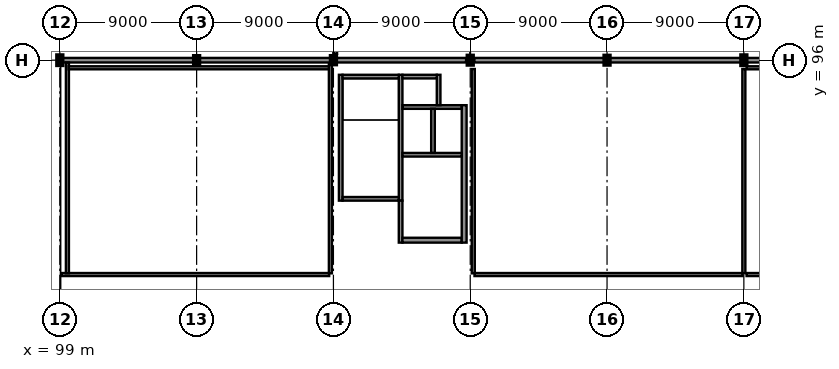
"""IFC4 building model, lengths in metres.
Left out: names, types, materials, properties, quantities, classifications, styles, units other than length and angle.
Written with IfcOpenShell. Run it as: python <this file> out.ifc"""

import sys

from ifc_helpers import new_model, si_unit, direction, frame, frame_2d, origin, origin_2d, place, context, subcontext, project, spatial, rectangle, i_section, extrude, element, fill, save


model = new_model("IFC4")
c1 = context("Model", 3, precision=1e-05, world=origin(), true_north=direction((0.0, 1.0)))
c2 = subcontext(c1, "Body", "Model", "MODEL_VIEW")
j1 = project(units=[si_unit("LENGTHUNIT", "METRE"), si_unit("PLANEANGLEUNIT", "RADIAN")], contexts=[c1])
p1 = place(None, origin())
s1 = spatial("IfcSite", under=j1, at=p1, CompositionType="ELEMENT")
p2 = place(p1, origin())
s2 = spatial("IfcBuilding", under=s1, at=p2, CompositionType="ELEMENT")
p3 = place(p2, frame((0.0, 0.0, 9.9)))
s3 = spatial("IfcBuildingStorey", under=s2, at=p3, CompositionType="ELEMENT", Elevation=9.9)
p4 = place(p3, frame((99.0, 96.0, 0.0), z_axis=(0.0, 0.0, 1.0), x_axis=(1.0, 0.0, 0.0)))
e1 = element("IfcColumn", 1, at=p4, inside=s3, PredefinedType="COLUMN", context=c2, shape_type="SweptSolid", body=[
    extrude(i_section(OverallWidth=0.3, OverallDepth=0.6, WebThickness=0.015, FlangeThickness=0.03, at=origin_2d()), origin(), (0.0, 0.0, 1.0), 4.5),
])
for number, where, z_axis, x_axis in (
    (2, (108.0, 96.0, 0.0), (0.0, 0.0, 1.0), (1.0, 0.0, 0.0)),
    (3, (117.0, 96.0, 0.0), (0.0, 0.0, 1.0), (1.0, 0.0, 0.0)),
):
    element("IfcColumn", number, at=place(p3, frame(where, z_axis=z_axis, x_axis=x_axis)), inside=s3, PredefinedType="COLUMN", context=c2, shape_type="SweptSolid", body=[
        extrude(i_section(OverallWidth=0.3, OverallDepth=0.5, WebThickness=0.014, FlangeThickness=0.028, at=origin_2d()), origin(), (0.0, 0.0, 1.0), 4.5),
    ])
for number, where, z_axis, x_axis in (
    (4, (126.0, 96.0, 0.0), (0.0, 0.0, 1.0), (0.0, 1.0, 0.0)),
    (5, (135.0, 96.0, 0.0), (0.0, 0.0, 1.0), (1.0, 0.0, 0.0)),
):
    element("IfcColumn", number, at=place(p3, frame(where, z_axis=z_axis, x_axis=x_axis)), inside=s3, PredefinedType="COLUMN", context=c2, shape_type="SweptSolid", body=[
        extrude(i_section(OverallWidth=0.3, OverallDepth=0.55, WebThickness=0.015, FlangeThickness=0.029, at=origin_2d()), origin(), (0.0, 0.0, 1.0), 4.5),
    ])
p5 = place(p3, frame((144.0, 96.0, 0.0), z_axis=(0.0, 0.0, 1.0), x_axis=(1.0, 0.0, 0.0)))
e6 = element("IfcColumn", 6, at=p5, inside=s3, PredefinedType="COLUMN", context=c2, shape_type="SweptSolid", body=[
    extrude(i_section(OverallWidth=0.3, OverallDepth=0.6, WebThickness=0.015, FlangeThickness=0.03, at=origin_2d()), origin(), (0.0, 0.0, 1.0), 4.5),
])
p6 = place(p3, frame((152.992, 96.0, 0.0), z_axis=(0.0, 0.0, 1.0), x_axis=(-1.0, 0.0, 0.0)))
e7 = element("IfcWall", 7, at=p6, inside=s3, PredefinedType="SOLIDWALL", context=c2, shape_type="SweptSolid", body=[
    extrude(rectangle(XDim=8.984, YDim=0.3, at=frame_2d((4.492, 0.0))), origin(), (0.0, 0.0, 1.0), 3.187),
])
p7 = place(p6, frame((2.045, 0.0, 0.9)))
e8 = element("IfcOpeningElement", 8, at=p7, cuts=e7, PredefinedType="OPENING", context=c2, shape_type="SweptSolid", body=[
    extrude(rectangle(XDim=1.3, YDim=1.3, at=frame_2d((0.65, 0.65))), frame((0.0, 0.165, 0.0), z_axis=(0.0, -1.0, 0.0), x_axis=(1.0, 0.0, 0.0)), (0.0, 0.0, 1.0), 0.33),
])
p8 = place(p6, frame((5.639, 0.0, 0.9)))
e9 = element("IfcOpeningElement", 9, at=p8, cuts=e7, PredefinedType="OPENING", context=c2, shape_type="SweptSolid", body=[
    extrude(rectangle(XDim=1.3, YDim=1.3, at=frame_2d((0.65, 0.65))), frame((0.0, 0.165, 0.0), z_axis=(0.0, -1.0, 0.0), x_axis=(1.0, 0.0, 0.0)), (0.0, 0.0, 1.0), 0.33),
])
p9 = place(p3, frame((143.992, 96.0, 0.0), z_axis=(0.0, 0.0, 1.0), x_axis=(-1.0, 0.0, 0.0)))
e10 = element("IfcWall", 10, at=p9, inside=s3, PredefinedType="SOLIDWALL", context=c2, shape_type="SweptSolid", body=[
    extrude(rectangle(XDim=8.984, YDim=0.3, at=frame_2d((4.492, 0.0))), origin(), (0.0, 0.0, 1.0), 3.187),
])
p10 = place(p9, frame((2.045, 0.0, 0.9)))
e11 = element("IfcOpeningElement", 11, at=p10, cuts=e10, PredefinedType="OPENING", context=c2, shape_type="SweptSolid", body=[
    extrude(rectangle(XDim=1.3, YDim=1.3, at=frame_2d((0.65, 0.65))), frame((0.0, 0.165, 0.0), z_axis=(0.0, -1.0, 0.0), x_axis=(1.0, 0.0, 0.0)), (0.0, 0.0, 1.0), 0.33),
])
p11 = place(p9, frame((5.639, 0.0, 0.9)))
e12 = element("IfcOpeningElement", 12, at=p11, cuts=e10, PredefinedType="OPENING", context=c2, shape_type="SweptSolid", body=[
    extrude(rectangle(XDim=1.3, YDim=1.3, at=frame_2d((0.65, 0.65))), frame((0.0, 0.165, 0.0), z_axis=(0.0, -1.0, 0.0), x_axis=(1.0, 0.0, 0.0)), (0.0, 0.0, 1.0), 0.33),
])
p12 = place(p3, frame((134.992, 96.0, 0.0), z_axis=(0.0, 0.0, 1.0), x_axis=(-1.0, 0.0, 0.0)))
e13 = element("IfcWall", 13, at=p12, inside=s3, PredefinedType="SOLIDWALL", context=c2, shape_type="SweptSolid", body=[
    extrude(rectangle(XDim=8.719, YDim=0.3, at=frame_2d((4.359, 0.0))), origin(), (0.0, 0.0, 1.0), 3.605),
])
p13 = place(p12, frame((3.992, 0.0, 0.0)))
e14 = element("IfcOpeningElement", 14, at=p13, cuts=e13, PredefinedType="OPENING", context=c2, shape_type="SweptSolid", body=[
    extrude(rectangle(XDim=1.0, YDim=2.2, at=frame_2d((0.5, 1.1))), frame((0.0, 0.165, 0.0), z_axis=(0.0, -1.0, 0.0), x_axis=(1.0, 0.0, 0.0)), (0.0, 0.0, 1.0), 0.33),
])
p14 = place(p3, frame((125.727, 96.0, 0.0), z_axis=(0.0, 0.0, 1.0), x_axis=(-1.0, 0.0, 0.0)))
e15 = element("IfcWall", 15, at=p14, inside=s3, PredefinedType="SOLIDWALL", context=c2, shape_type="SweptSolid", body=[
    extrude(rectangle(XDim=8.719, YDim=0.3, at=frame_2d((4.359, 0.0))), origin(), (0.0, 0.0, 1.0), 3.605),
])
p15 = place(p3, frame((116.992, 96.0, 0.0), z_axis=(0.0, 0.0, 1.0), x_axis=(-1.0, 0.0, 0.0)))
e16 = element("IfcWall", 16, at=p15, inside=s3, PredefinedType="SOLIDWALL", context=c2, shape_type="SweptSolid", body=[
    extrude(rectangle(XDim=8.984, YDim=0.3, at=frame_2d((4.492, 0.0))), origin(), (0.0, 0.0, 1.0), 3.605),
])
p16 = place(p3, frame((107.992, 96.0, 0.0), z_axis=(0.0, 0.0, 1.0), x_axis=(-1.0, 0.0, 0.0)))
e17 = element("IfcWall", 17, at=p16, inside=s3, PredefinedType="SOLIDWALL", context=c2, shape_type="SweptSolid", body=[
    extrude(rectangle(XDim=8.934, YDim=0.3, at=frame_2d((4.467, 0.0))), origin(), (0.0, 0.0, 1.0), 3.605),
])
p17 = place(p16, frame((1.502, 0.0, 0.8)))
e18 = element("IfcOpeningElement", 18, at=p17, cuts=e17, PredefinedType="OPENING", context=c2, shape_type="SweptSolid", body=[
    extrude(rectangle(XDim=2.0, YDim=2.0, at=frame_2d((1.0, 1.0))), frame((0.0, 0.165, 0.0), z_axis=(0.0, -1.0, 0.0), x_axis=(1.0, 0.0, 0.0)), (0.0, 0.0, 1.0), 0.33),
])
p18 = place(p16, frame((5.432, 0.0, 0.8)))
e19 = element("IfcOpeningElement", 19, at=p18, cuts=e17, PredefinedType="OPENING", context=c2, shape_type="SweptSolid", body=[
    extrude(rectangle(XDim=2.0, YDim=2.0, at=frame_2d((1.0, 1.0))), frame((0.0, 0.165, 0.0), z_axis=(0.0, -1.0, 0.0), x_axis=(1.0, 0.0, 0.0)), (0.0, 0.0, 1.0), 0.33),
])
p19 = place(p3, frame((117.12, 96.42, 0.0), z_axis=(0.0, 0.0, 1.0), x_axis=(0.0, 1.0, 0.0)))
e20 = element("IfcWall", 20, at=p19, inside=s3, PredefinedType="PARAPET", context=c2, shape_type="SweptSolid", body=[
    extrude(rectangle(XDim=11.52, YDim=0.24, at=frame_2d((5.76, 0.0))), origin(), (0.0, 0.0, 1.0), 1.1),
])
p20 = place(p3, frame((117.48, 86.76, 0.0), z_axis=(0.0, 0.0, 1.0), x_axis=(0.0, 1.0, 0.0)))
e21 = element("IfcWall", 21, at=p20, inside=s3, PredefinedType="SHEAR", context=c2, shape_type="SweptSolid", body=[
    extrude(rectangle(XDim=8.28, YDim=0.24, at=frame_2d((4.14, 0.0))), origin(), (0.0, 0.0, 1.0), 4.31),
])
p21 = place(p3, frame((121.42, 86.76, 0.0), z_axis=(0.0, 0.0, 1.0), x_axis=(0.0, 1.0, 0.0)))
e22 = element("IfcWall", 22, at=p21, inside=s3, PredefinedType="SHEAR", context=c2, shape_type="SweptSolid", body=[
    extrude(rectangle(XDim=8.28, YDim=0.24, at=frame_2d((4.14, 0.0))), origin(), (0.0, 0.0, 1.0), 4.31),
])
p22 = place(p21, frame((0.54, 0.0, 0.0)))
e23 = element("IfcOpeningElement", 23, at=p22, cuts=e22, PredefinedType="OPENING", context=c2, shape_type="SweptSolid", body=[
    extrude(rectangle(XDim=1.2, YDim=2.15, at=frame_2d((0.6, 1.075))), frame((0.0, 0.135, 0.0), z_axis=(0.0, -1.0, 0.0), x_axis=(1.0, 0.0, 0.0)), (0.0, 0.0, 1.0), 0.27),
])
for number, where, z_axis, x_axis in (
    (24, (117.6, 86.88, 0.0), (0.0, 0.0, 1.0), (1.0, 0.0, 0.0)),
    (25, (117.6, 94.92, 0.0), (0.0, 0.0, 1.0), (1.0, 0.0, 0.0)),
):
    element("IfcWall", number, at=place(p3, frame(where, z_axis=z_axis, x_axis=x_axis)), inside=s3, PredefinedType="SHEAR", context=c2, shape_type="SweptSolid", body=[
        extrude(rectangle(XDim=3.7, YDim=0.24, at=frame_2d((1.85, 0.0))), origin(), (0.0, 0.0, 1.0), 4.31),
    ])
p23 = place(p3, frame((121.42, 84.0, 0.0), z_axis=(0.0, 0.0, 1.0), x_axis=(0.0, 1.0, 0.0)))
e26 = element("IfcWall", 26, at=p23, inside=s3, PredefinedType="SHEAR", context=c2, shape_type="SweptSolid", body=[
    extrude(rectangle(XDim=2.76, YDim=0.24, at=frame_2d((1.38, 0.0))), origin(), (0.0, 0.0, 1.0), 4.16),
])
p24 = place(p3, frame((121.54, 84.16, 0.0), z_axis=(0.0, 0.0, 1.0), x_axis=(1.0, 0.0, 0.0)))
e27 = element("IfcWall", 27, at=p24, inside=s3, PredefinedType="SHEAR", context=c2, shape_type="SweptSolid", body=[
    extrude(rectangle(XDim=3.9, YDim=0.32, at=frame_2d((1.95, 0.0))), origin(), (0.0, 0.0, 1.0), 4.16),
])
p25 = place(p24, frame((1.225, 0.0, 0.0)))
e28 = element("IfcOpeningElement", 28, at=p25, cuts=e27, PredefinedType="OPENING", context=c2, shape_type="SweptSolid", body=[
    extrude(rectangle(XDim=1.45, YDim=2.2, at=frame_2d((0.725, 1.1))), frame((0.0, 0.175, 0.0), z_axis=(0.0, -1.0, 0.0), x_axis=(1.0, 0.0, 0.0)), (0.0, 0.0, 1.0), 0.35),
])
p26 = place(p3, frame((125.6, 84.0, 0.0), z_axis=(0.0, 0.0, 1.0), x_axis=(0.0, 1.0, 0.0)))
e29 = element("IfcWall", 29, at=p26, inside=s3, PredefinedType="SHEAR", context=c2, shape_type="SweptSolid", body=[
    extrude(rectangle(XDim=9.04, YDim=0.32, at=frame_2d((4.52, 0.0))), origin(), (0.0, 0.0, 1.0), 4.16),
])
p27 = place(p3, frame((121.54, 89.78, 0.0), z_axis=(0.0, 0.0, 1.0), x_axis=(1.0, 0.0, 0.0)))
e30 = element("IfcWall", 30, at=p27, inside=s3, PredefinedType="SHEAR", context=c2, shape_type="SweptSolid", body=[
    extrude(rectangle(XDim=3.9, YDim=0.24, at=frame_2d((1.95, 0.0))), origin(), (0.0, 0.0, 1.0), 4.31),
])
p28 = place(p27, frame((0.385, 0.0, 0.0)))
e31 = element("IfcOpeningElement", 31, at=p28, cuts=e30, PredefinedType="OPENING", context=c2, shape_type="SweptSolid", body=[
    extrude(rectangle(XDim=1.3, YDim=2.2, at=frame_2d((0.65, 1.1))), frame((0.0, 0.135, 0.0), z_axis=(0.0, -1.0, 0.0), x_axis=(1.0, 0.0, 0.0)), (0.0, 0.0, 1.0), 0.27),
])
p29 = place(p27, frame((2.335, 0.0, 0.0)))
e32 = element("IfcOpeningElement", 32, at=p29, cuts=e30, PredefinedType="OPENING", context=c2, shape_type="SweptSolid", body=[
    extrude(rectangle(XDim=1.3, YDim=2.2, at=frame_2d((0.65, 1.1))), frame((0.0, 0.135, 0.0), z_axis=(0.0, -1.0, 0.0), x_axis=(1.0, 0.0, 0.0)), (0.0, 0.0, 1.0), 0.27),
])
p30 = place(p3, frame((121.54, 92.92, 0.0), z_axis=(0.0, 0.0, 1.0), x_axis=(1.0, 0.0, 0.0)))
e33 = element("IfcWall", 33, at=p30, inside=s3, PredefinedType="SHEAR", context=c2, shape_type="SweptSolid", body=[
    extrude(rectangle(XDim=3.9, YDim=0.24, at=frame_2d((1.95, 0.0))), origin(), (0.0, 0.0, 1.0), 4.31),
])
p31 = place(p3, frame((123.55, 89.9, 0.0), z_axis=(0.0, 0.0, 1.0), x_axis=(0.0, 1.0, 0.0)))
e34 = element("IfcWall", 34, at=p31, inside=s3, PredefinedType="SHEAR", context=c2, shape_type="SweptSolid", body=[
    extrude(rectangle(XDim=2.9, YDim=0.24, at=frame_2d((1.45, 0.0))), origin(), (0.0, 0.0, 1.0), 4.31),
])
p32 = place(p3, frame((123.92, 93.04, 0.0), z_axis=(0.0, 0.0, 1.0), x_axis=(0.0, 1.0, 0.0)))
e35 = element("IfcWall", 35, at=p32, inside=s3, PredefinedType="SHEAR", context=c2, shape_type="SweptSolid", body=[
    extrude(rectangle(XDim=2.0, YDim=0.24, at=frame_2d((1.0, 0.0))), origin(), (0.0, 0.0, 1.0), 4.31),
])
p33 = place(p3, frame((121.54, 94.92, 0.0), z_axis=(0.0, 0.0, 1.0), x_axis=(1.0, 0.0, 0.0)))
e36 = element("IfcWall", 36, at=p33, inside=s3, PredefinedType="SHEAR", context=c2, shape_type="SweptSolid", body=[
    extrude(rectangle(XDim=2.26, YDim=0.24, at=frame_2d((1.13, 0.0))), origin(), (0.0, 0.0, 1.0), 4.31),
])
p34 = place(p3, frame((116.72, 81.9, 0.0), z_axis=(0.0, 0.0, 1.0), x_axis=(-1.0, 0.0, 0.0)))
e37 = element("IfcWall", 37, at=p34, inside=s3, PredefinedType="PARTITIONING", context=c2, shape_type="SweptSolid", body=[
    extrude(rectangle(XDim=17.595, YDim=0.2, at=frame_2d((8.797, 0.0))), origin(), (0.0, 0.0, 1.0), 4.14),
])
p35 = place(p34, frame((7.797, 0.0, 0.0)))
e38 = element("IfcOpeningElement", 38, at=p35, cuts=e37, PredefinedType="OPENING", context=c2, shape_type="SweptSolid", body=[
    extrude(rectangle(XDim=2.0, YDim=2.6, at=frame_2d((1.0, 1.3))), frame((0.0, 0.115, 0.0), z_axis=(0.0, -1.0, 0.0), x_axis=(1.0, 0.0, 0.0)), (0.0, 0.0, 1.0), 0.23),
])
p36 = place(p3, frame((99.5, 81.98, 0.0), z_axis=(0.0, 0.0, 1.0), x_axis=(0.0, 1.0, 0.0)))
e39 = element("IfcWall", 39, at=p36, inside=s3, PredefinedType="PARTITIONING", context=c2, shape_type="SweptSolid", body=[
    extrude(rectangle(XDim=13.875, YDim=0.2, at=frame_2d((6.938, 0.0))), origin(), (0.0, 0.0, 1.0), 4.14),
])
p37 = place(p3, frame((99.58, 95.5, 0.0), z_axis=(0.0, 0.0, 1.0), x_axis=(1.0, 0.0, 0.0)))
e40 = element("IfcWall", 40, at=p37, inside=s3, PredefinedType="PARTITIONING", context=c2, shape_type="SweptSolid", body=[
    extrude(rectangle(XDim=17.14, YDim=0.2, at=frame_2d((8.57, 0.0))), origin(), (0.0, 0.0, 1.0), 4.14),
])
p38 = place(p3, frame((116.8, 95.752, 0.0), z_axis=(0.0, 0.0, 1.0), x_axis=(0.0, -1.0, 0.0)))
e41 = element("IfcWall", 41, at=p38, inside=s3, PredefinedType="PARTITIONING", context=c2, shape_type="SweptSolid", body=[
    extrude(rectangle(XDim=13.772, YDim=0.2, at=frame_2d((6.886, 0.0))), origin(), (0.0, 0.0, 1.0), 3.495),
])
p39 = place(p3, frame((126.2, 81.98, 0.0), z_axis=(0.0, 0.0, 1.0), x_axis=(0.0, 1.0, 0.0)))
e42 = element("IfcWall", 42, at=p39, inside=s3, PredefinedType="PARTITIONING", context=c2, shape_type="SweptSolid", body=[
    extrude(rectangle(XDim=13.44, YDim=0.2, at=frame_2d((6.72, 0.0))), origin(), (0.0, 0.0, 1.0), 3.505),
])
p40 = place(p3, frame((144.0, 95.42, 0.0), z_axis=(0.0, 0.0, 1.0), x_axis=(0.0, -1.0, 0.0)))
e43 = element("IfcWall", 43, at=p40, inside=s3, PredefinedType="PARTITIONING", context=c2, shape_type="SweptSolid", body=[
    extrude(rectangle(XDim=13.44, YDim=0.2, at=frame_2d((6.72, 0.0))), origin(), (0.0, 0.0, 1.0), 3.395),
])
p41 = place(p3, frame((143.92, 81.9, 0.0), z_axis=(0.0, 0.0, 1.0), x_axis=(-1.0, 0.0, 0.0)))
e44 = element("IfcWall", 44, at=p41, inside=s3, PredefinedType="PARTITIONING", context=c2, shape_type="SweptSolid", body=[
    extrude(rectangle(XDim=17.64, YDim=0.2, at=frame_2d((8.82, 0.0))), origin(), (0.0, 0.0, 1.0), 4.14),
])
p42 = place(p41, frame((7.87, 0.0, 0.0)))
e45 = element("IfcOpeningElement", 45, at=p42, cuts=e44, PredefinedType="OPENING", context=c2, shape_type="SweptSolid", body=[
    extrude(rectangle(XDim=1.9, YDim=2.5, at=frame_2d((0.95, 1.25))), frame((0.0, 0.115, 0.0), z_axis=(0.0, -1.0, 0.0), x_axis=(1.0, 0.0, 0.0)), (0.0, 0.0, 1.0), 0.23),
])
p43 = place(p3, frame((153.365, 81.9, 0.0), z_axis=(0.0, 0.0, 1.0), x_axis=(-1.0, 0.0, 0.0)))
e46 = element("IfcWall", 46, at=p43, inside=s3, PredefinedType="PARTITIONING", context=c2, shape_type="SweptSolid", body=[
    extrude(rectangle(XDim=9.185, YDim=0.2, at=frame_2d((4.593, 0.0))), origin(), (0.0, 0.0, 1.0), 4.14),
])
p44 = place(p43, frame((3.693, 0.0, 0.0)))
e47 = element("IfcOpeningElement", 47, at=p44, cuts=e46, PredefinedType="OPENING", context=c2, shape_type="SweptSolid", body=[
    extrude(rectangle(XDim=1.8, YDim=2.45, at=frame_2d((0.9, 1.225))), frame((0.0, 0.115, 0.0), z_axis=(0.0, -1.0, 0.0), x_axis=(1.0, 0.0, 0.0)), (0.0, 0.0, 1.0), 0.23),
])
p45 = place(p3, frame((144.18, 95.5, 0.0), z_axis=(0.0, 0.0, 1.0), x_axis=(1.0, 0.0, 0.0)))
e48 = element("IfcWall", 48, at=p45, inside=s3, PredefinedType="PARTITIONING", context=c2, shape_type="SweptSolid", body=[
    extrude(rectangle(XDim=8.94, YDim=0.2, at=frame_2d((4.47, 0.0))), origin(), (0.0, 0.0, 1.0), 4.14),
])
p46 = place(p13, frame((1.0, 0.0, 0.0), z_axis=(0.0, 0.0, 1.0), x_axis=(-1.0, 0.0, 0.0)))
e49 = element("IfcDoor", 49, at=p46, inside=s3, OperationType="SINGLE_SWING_RIGHT", PredefinedType="DOOR", context=c2, shape_type="SweptSolid", body=[
    extrude(rectangle(XDim=1.0, YDim=2.2, at=frame_2d((0.5, 1.1))), frame((0.0, 0.025, 0.0), z_axis=(0.0, -1.0, 0.0), x_axis=(1.0, 0.0, 0.0)), (0.0, 0.0, 1.0), 0.05),
])
fill(e14, e49)
p47 = place(p10, origin())
e50 = element("IfcWindow", 50, at=p47, inside=s3, PartitioningType="SINGLE_PANEL", PredefinedType="WINDOW", context=c2, shape_type="SweptSolid", body=[
    extrude(rectangle(XDim=1.3, YDim=1.3, at=frame_2d((0.65, 0.65))), frame((0.0, 0.03, 0.0), z_axis=(0.0, -1.0, 0.0), x_axis=(1.0, 0.0, 0.0)), (0.0, 0.0, 1.0), 0.06),
])
fill(e11, e50)
p48 = place(p11, origin())
e51 = element("IfcWindow", 51, at=p48, inside=s3, PartitioningType="SINGLE_PANEL", PredefinedType="WINDOW", context=c2, shape_type="SweptSolid", body=[
    extrude(rectangle(XDim=1.3, YDim=1.3, at=frame_2d((0.65, 0.65))), frame((0.0, 0.03, 0.0), z_axis=(0.0, -1.0, 0.0), x_axis=(1.0, 0.0, 0.0)), (0.0, 0.0, 1.0), 0.06),
])
fill(e12, e51)
p49 = place(p17, origin())
e52 = element("IfcWindow", 52, at=p49, inside=s3, PartitioningType="SINGLE_PANEL", PredefinedType="WINDOW", context=c2, shape_type="SweptSolid", body=[
    extrude(rectangle(XDim=2.0, YDim=2.0, at=frame_2d((1.0, 1.0))), frame((0.0, 0.03, 0.0), z_axis=(0.0, -1.0, 0.0), x_axis=(1.0, 0.0, 0.0)), (0.0, 0.0, 1.0), 0.06),
])
fill(e18, e52)
p50 = place(p18, origin())
e53 = element("IfcWindow", 53, at=p50, inside=s3, PartitioningType="SINGLE_PANEL", PredefinedType="WINDOW", context=c2, shape_type="SweptSolid", body=[
    extrude(rectangle(XDim=2.0, YDim=2.0, at=frame_2d((1.0, 1.0))), frame((0.0, 0.03, 0.0), z_axis=(0.0, -1.0, 0.0), x_axis=(1.0, 0.0, 0.0)), (0.0, 0.0, 1.0), 0.06),
])
fill(e19, e53)
p51 = place(p22, frame((1.2, 0.0, 0.0), z_axis=(0.0, 0.0, 1.0), x_axis=(-1.0, 0.0, 0.0)))
e54 = element("IfcDoor", 54, at=p51, inside=s3, OperationType="SINGLE_SWING_RIGHT", PredefinedType="DOOR", context=c2, shape_type="SweptSolid", body=[
    extrude(rectangle(XDim=1.2, YDim=2.15, at=frame_2d((0.6, 1.075))), frame((0.0, 0.025, 0.0), z_axis=(0.0, -1.0, 0.0), x_axis=(1.0, 0.0, 0.0)), (0.0, 0.0, 1.0), 0.05),
])
fill(e23, e54)
p52 = place(p25, origin())
e55 = element("IfcDoor", 55, at=p52, inside=s3, OperationType="DOUBLE_DOOR_SINGLE_SWING", PredefinedType="DOOR", context=c2, shape_type="SweptSolid", body=[
    extrude(rectangle(XDim=1.45, YDim=2.2, at=frame_2d((0.725, 1.1))), frame((0.0, 0.025, 0.0), z_axis=(0.0, -1.0, 0.0), x_axis=(1.0, 0.0, 0.0)), (0.0, 0.0, 1.0), 0.05),
])
fill(e28, e55)
p53 = place(p28, origin())
e56 = element("IfcDoor", 56, at=p53, inside=s3, OperationType="DOUBLE_DOOR_SLIDING", PredefinedType="DOOR", context=c2, shape_type="SweptSolid", body=[
    extrude(rectangle(XDim=1.3, YDim=2.2, at=frame_2d((0.65, 1.1))), frame((0.0, 0.025, 0.0), z_axis=(0.0, -1.0, 0.0), x_axis=(1.0, 0.0, 0.0)), (0.0, 0.0, 1.0), 0.05),
])
fill(e31, e56)
p54 = place(p29, origin())
e57 = element("IfcDoor", 57, at=p54, inside=s3, OperationType="DOUBLE_DOOR_SLIDING", PredefinedType="DOOR", context=c2, shape_type="SweptSolid", body=[
    extrude(rectangle(XDim=1.3, YDim=2.2, at=frame_2d((0.65, 1.1))), frame((0.0, 0.025, 0.0), z_axis=(0.0, -1.0, 0.0), x_axis=(1.0, 0.0, 0.0)), (0.0, 0.0, 1.0), 0.05),
])
fill(e32, e57)
p55 = place(p35, origin())
e58 = element("IfcDoor", 58, at=p55, inside=s3, OperationType="DOUBLE_DOOR_SINGLE_SWING", PredefinedType="DOOR", context=c2, shape_type="SweptSolid", body=[
    extrude(rectangle(XDim=2.0, YDim=2.6, at=frame_2d((1.0, 1.3))), frame((0.0, 0.025, 0.0), z_axis=(0.0, -1.0, 0.0), x_axis=(1.0, 0.0, 0.0)), (0.0, 0.0, 1.0), 0.05),
])
fill(e38, e58)
p56 = place(p42, frame((1.9, 0.0, 0.0), z_axis=(0.0, 0.0, 1.0), x_axis=(-1.0, 0.0, 0.0)))
e59 = element("IfcDoor", 59, at=p56, inside=s3, OperationType="DOUBLE_DOOR_SINGLE_SWING", PredefinedType="DOOR", context=c2, shape_type="SweptSolid", body=[
    extrude(rectangle(XDim=1.9, YDim=2.5, at=frame_2d((0.95, 1.25))), frame((0.0, 0.025, 0.0), z_axis=(0.0, -1.0, 0.0), x_axis=(1.0, 0.0, 0.0)), (0.0, 0.0, 1.0), 0.05),
])
fill(e45, e59)
save(model, sys.argv[1])
